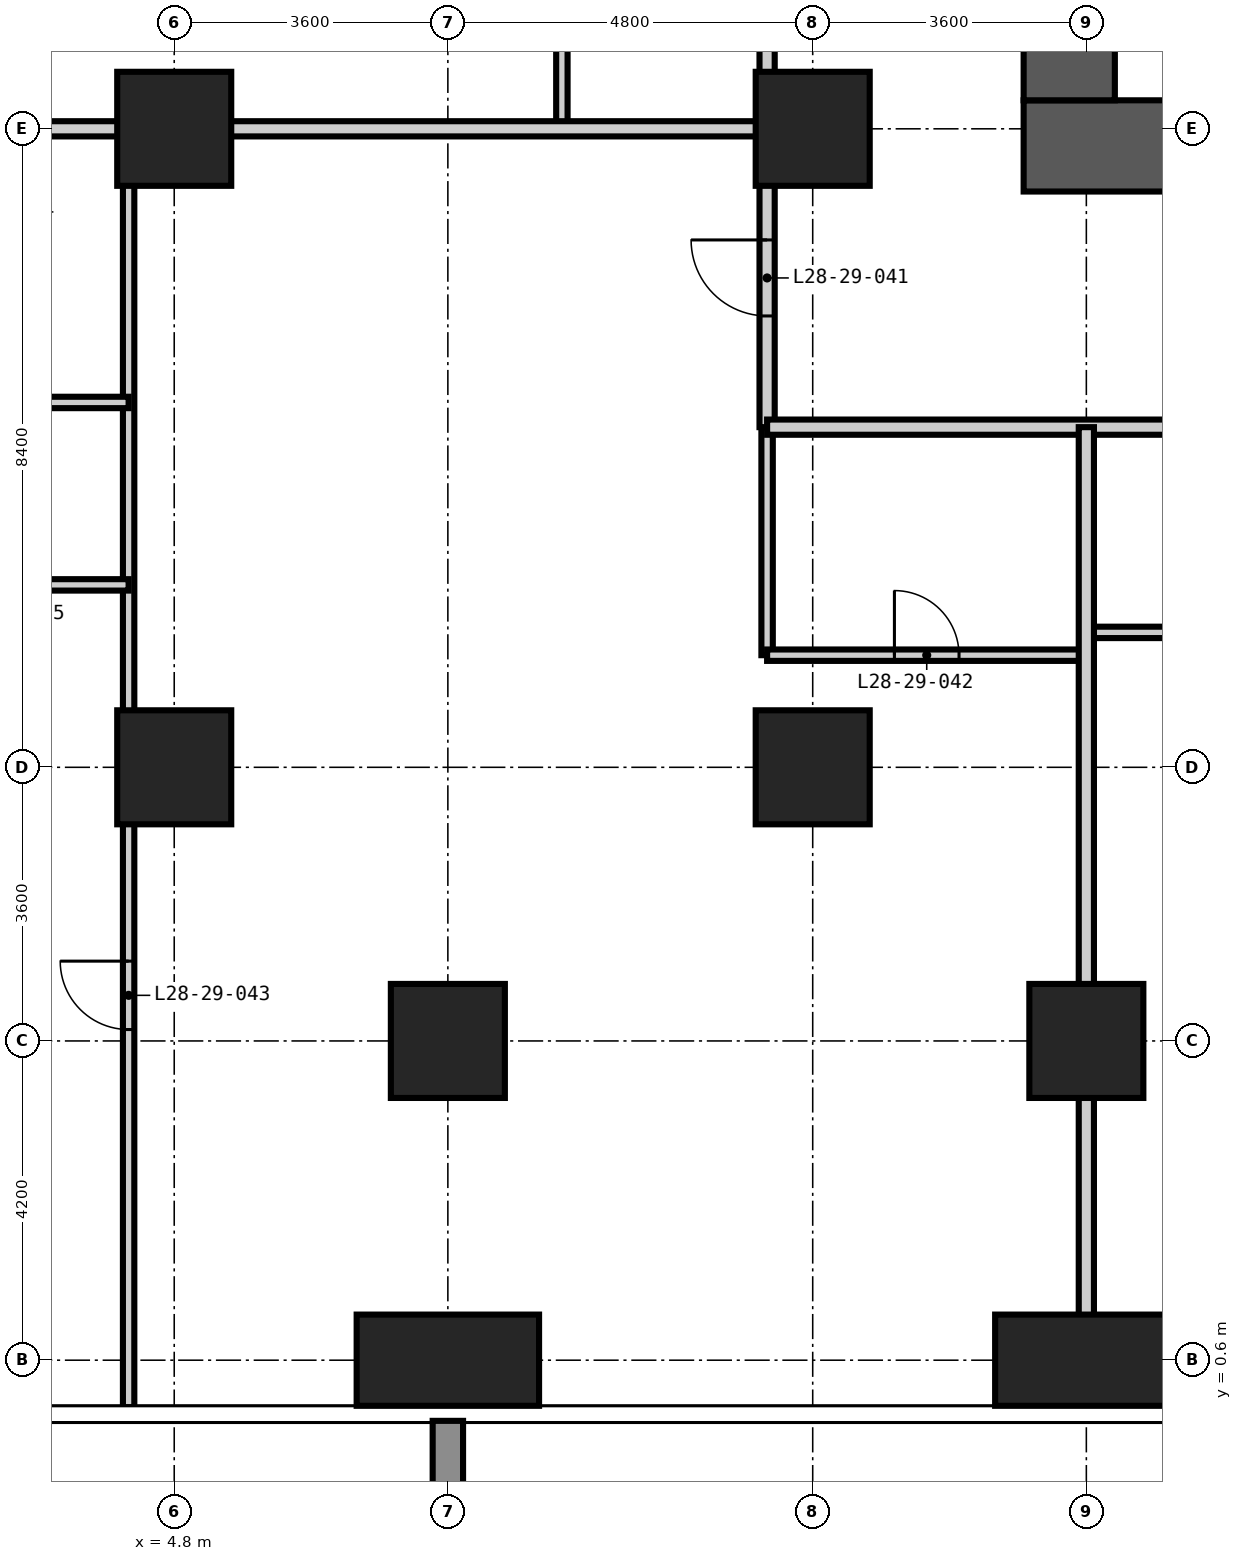
"""IFC4 building model, lengths in metres.
Left out: names, types, materials, properties, quantities, classifications, styles, units other than length and angle.
Written with IfcOpenShell. Run it as: python <this file> out.ifc"""

import sys

from ifc_helpers import new_model, si_unit, direction, frame, frame_2d, origin, origin_2d, place, context, subcontext, project, spatial, rectangle, extrude, element, fill, save


model = new_model("IFC4")
c1 = context("Model", 3, precision=1e-05, world=origin(), true_north=direction((0.0, 1.0)))
c2 = subcontext(c1, "Body", "Model", "MODEL_VIEW")
j1 = project(units=[si_unit("LENGTHUNIT", "METRE"), si_unit("PLANEANGLEUNIT", "RADIAN")], contexts=[c1])
p1 = place(None, origin())
s1 = spatial("IfcSite", under=j1, at=p1, CompositionType="ELEMENT")
p2 = place(p1, origin())
s2 = spatial("IfcBuilding", under=s1, at=p2, CompositionType="ELEMENT")
p3 = place(p2, frame((0.0, 0.0, 111.6)))
s3 = spatial("IfcBuildingStorey", under=s2, at=p3, CompositionType="ELEMENT", Elevation=111.6)
for number, where, z_axis, x_axis in (
    (1, (4.8, 8.4, -0.35), (0.0, 0.0, 1.0), (1.0, 0.0, 0.0)),
    (2, (4.8, 16.8, -0.35), (0.0, 0.0, 1.0), (1.0, 0.0, 0.0)),
):
    element("IfcColumn", number, at=place(p3, frame(where, z_axis=z_axis, x_axis=x_axis)), inside=s3, PredefinedType="COLUMN", context=c2, shape_type="SweptSolid", body=[
        extrude(rectangle(XDim=1.5, YDim=1.5, at=origin_2d()), origin(), (0.0, 0.0, 1.0), 3.6),
    ])
p4 = place(p3, frame((8.4, 0.6, -0.35), z_axis=(0.0, 0.0, 1.0), x_axis=(1.0, 0.0, 0.0)))
e3 = element("IfcColumn", 3, at=p4, inside=s3, PredefinedType="COLUMN", context=c2, shape_type="SweptSolid", body=[
    extrude(rectangle(XDim=2.4, YDim=1.2, at=origin_2d()), origin(), (0.0, 0.0, 1.0), 3.6),
])
for number, where, z_axis, x_axis in (
    (4, (8.4, 4.8, -0.35), (0.0, 0.0, 1.0), (1.0, 0.0, 0.0)),
    (5, (13.2, 8.4, -0.35), (0.0, 0.0, 1.0), (1.0, 0.0, 0.0)),
    (6, (13.2, 16.8, -0.35), (0.0, 0.0, 1.0), (1.0, 0.0, 0.0)),
):
    element("IfcColumn", number, at=place(p3, frame(where, z_axis=z_axis, x_axis=x_axis)), inside=s3, PredefinedType="COLUMN", context=c2, shape_type="SweptSolid", body=[
        extrude(rectangle(XDim=1.5, YDim=1.5, at=origin_2d()), origin(), (0.0, 0.0, 1.0), 3.6),
    ])
p5 = place(p3, frame((16.8, 0.6, -0.35), z_axis=(0.0, 0.0, 1.0), x_axis=(1.0, 0.0, 0.0)))
e7 = element("IfcColumn", 7, at=p5, inside=s3, PredefinedType="COLUMN", context=c2, shape_type="SweptSolid", body=[
    extrude(rectangle(XDim=2.4, YDim=1.2, at=origin_2d()), origin(), (0.0, 0.0, 1.0), 3.6),
])
p6 = place(p3, frame((16.8, 4.8, -0.35), z_axis=(0.0, 0.0, 1.0), x_axis=(1.0, 0.0, 0.0)))
e8 = element("IfcColumn", 8, at=p6, inside=s3, PredefinedType="COLUMN", context=c2, shape_type="SweptSolid", body=[
    extrude(rectangle(XDim=1.5, YDim=1.5, at=origin_2d()), origin(), (0.0, 0.0, 1.0), 3.6),
])
p7 = place(p3, frame((15.975, 16.575, -0.35), z_axis=(0.0, 0.0, 1.0), x_axis=(1.0, 0.0, 0.0)))
e9 = element("IfcWall", 9, at=p7, inside=s3, PredefinedType="SHEAR", context=c2, shape_type="SweptSolid", body=[
    extrude(rectangle(XDim=26.85, YDim=1.2, at=frame_2d((13.425, 0.0))), origin(), (0.0, 0.0, 1.0), 3.6),
])
p8 = place(p7, frame((12.925, 0.0, 0.35)))
e10 = element("IfcOpeningElement", 10, at=p8, cuts=e9, PredefinedType="OPENING", context=c2, shape_type="SweptSolid", body=[
    extrude(rectangle(XDim=1.0, YDim=2.1, at=frame_2d((0.5, 1.05))), frame((0.0, 0.61, 0.0), z_axis=(0.0, -1.0, 0.0), x_axis=(1.0, 0.0, 0.0)), (0.0, 0.0, 1.0), 1.22),
])
p9 = place(p7, frame((19.225, 0.0, 0.35)))
e11 = element("IfcOpeningElement", 11, at=p9, cuts=e9, PredefinedType="OPENING", context=c2, shape_type="SweptSolid", body=[
    extrude(rectangle(XDim=1.0, YDim=2.1, at=frame_2d((0.5, 1.05))), frame((0.0, 0.61, 0.0), z_axis=(0.0, -1.0, 0.0), x_axis=(1.0, 0.0, 0.0)), (0.0, 0.0, 1.0), 1.22),
])
p10 = place(p3, frame((16.575, 41.625, -0.35), z_axis=(0.0, 0.0, 1.0), x_axis=(0.0, -1.0, 0.0)))
e12 = element("IfcWall", 12, at=p10, inside=s3, PredefinedType="SHEAR", context=c2, shape_type="SweptSolid", body=[
    extrude(rectangle(XDim=24.45, YDim=1.2, at=frame_2d((12.225, 0.0))), origin(), (0.0, 0.0, 1.0), 3.6),
])
p11 = place(p10, frame((11.325, 0.0, 0.35)))
e13 = element("IfcOpeningElement", 13, at=p11, cuts=e12, PredefinedType="OPENING", context=c2, shape_type="SweptSolid", body=[
    extrude(rectangle(XDim=1.8, YDim=2.2, at=frame_2d((0.9, 1.1))), frame((0.0, 0.61, 0.0), z_axis=(0.0, -1.0, 0.0), x_axis=(1.0, 0.0, 0.0)), (0.0, 0.0, 1.0), 1.22),
])
p12 = place(p10, frame((20.125, 0.0, 0.35)))
e14 = element("IfcOpeningElement", 14, at=p12, cuts=e12, PredefinedType="OPENING", context=c2, shape_type="SweptSolid", body=[
    extrude(rectangle(XDim=1.0, YDim=2.1, at=frame_2d((0.5, 1.05))), frame((0.0, 0.61, 0.0), z_axis=(0.0, -1.0, 0.0), x_axis=(1.0, 0.0, 0.0)), (0.0, 0.0, 1.0), 1.22),
])
p13 = place(p10, frame((5.425, 0.0, 0.35)))
e15 = element("IfcOpeningElement", 15, at=p13, cuts=e12, PredefinedType="OPENING", context=c2, shape_type="SweptSolid", body=[
    extrude(rectangle(XDim=1.0, YDim=2.1, at=frame_2d((0.5, 1.05))), frame((0.0, 0.61, 0.0), z_axis=(0.0, -1.0, 0.0), x_axis=(1.0, 0.0, 0.0)), (0.0, 0.0, 1.0), 1.22),
])
p14 = place(p3, frame((9.9, 16.8, 0.0), z_axis=(0.0, 0.0, 1.0), x_axis=(0.0, 1.0, 0.0)))
e16 = element("IfcWall", 16, at=p14, inside=s3, PredefinedType="PARTITIONING", context=c2, shape_type="SweptSolid", body=[
    extrude(rectangle(XDim=2.4, YDim=0.15, at=frame_2d((1.2, 0.0))), origin(), (0.0, 0.0, 1.0), 3.25),
])
p15 = place(p3, frame((12.6, 9.875, 0.0), z_axis=(0.0, 0.0, 1.0), x_axis=(0.0, 1.0, 0.0)))
e17 = element("IfcWall", 17, at=p15, inside=s3, PredefinedType="PARTITIONING", context=c2, shape_type="SweptSolid", body=[
    extrude(rectangle(XDim=3.0, YDim=0.15, at=frame_2d((1.5, 0.0))), origin(), (0.0, 0.0, 1.0), 3.25),
])
p16 = place(p3, frame((12.6, 9.875, 0.0), z_axis=(0.0, 0.0, 1.0), x_axis=(1.0, 0.0, 0.0)))
e18 = element("IfcWall", 18, at=p16, inside=s3, PredefinedType="PARTITIONING", context=c2, shape_type="SweptSolid", body=[
    extrude(rectangle(XDim=4.2, YDim=0.15, at=frame_2d((2.1, 0.0))), origin(), (0.0, 0.0, 1.0), 3.25),
])
p17 = place(p16, frame((1.675, 0.0, 0.0)))
e19 = element("IfcOpeningElement", 19, at=p17, cuts=e18, PredefinedType="OPENING", context=c2, shape_type="SweptSolid", body=[
    extrude(rectangle(XDim=0.85, YDim=2.1, at=frame_2d((0.425, 1.05))), frame((0.0, 0.085, 0.0), z_axis=(0.0, -1.0, 0.0), x_axis=(1.0, 0.0, 0.0)), (0.0, 0.0, 1.0), 0.17),
])
p18 = place(p3, frame((16.8, 10.175, 0.0), z_axis=(0.0, 0.0, 1.0), x_axis=(1.0, 0.0, 0.0)))
e20 = element("IfcWall", 20, at=p18, inside=s3, PredefinedType="PARTITIONING", context=c2, shape_type="SweptSolid", body=[
    extrude(rectangle(XDim=2.4, YDim=0.15, at=frame_2d((1.2, 0.0))), origin(), (0.0, 0.0, 1.0), 3.25),
])
p19 = place(p3, frame((12.6, 12.875, 0.0), z_axis=(0.0, 0.0, 1.0), x_axis=(0.0, 1.0, 0.0)))
e21 = element("IfcWall", 21, at=p19, inside=s3, PredefinedType="PARTITIONING", context=c2, shape_type="SweptSolid", body=[
    extrude(rectangle(XDim=31.85, YDim=0.2, at=frame_2d((15.925, 0.0))), origin(), (0.0, 0.0, 1.0), 3.25),
])
p20 = place(p19, frame((8.825, 0.0, 0.0)))
e22 = element("IfcOpeningElement", 22, at=p20, cuts=e21, PredefinedType="OPENING", context=c2, shape_type="SweptSolid", body=[
    extrude(rectangle(XDim=1.0, YDim=2.2, at=frame_2d((0.5, 1.1))), frame((0.0, 0.11, 0.0), z_axis=(0.0, -1.0, 0.0), x_axis=(1.0, 0.0, 0.0)), (0.0, 0.0, 1.0), 0.22),
])
p21 = place(p19, frame((17.225, 0.0, 0.0)))
e23 = element("IfcOpeningElement", 23, at=p21, cuts=e21, PredefinedType="OPENING", context=c2, shape_type="SweptSolid", body=[
    extrude(rectangle(XDim=1.0, YDim=2.2, at=frame_2d((0.5, 1.1))), frame((0.0, 0.11, 0.0), z_axis=(0.0, -1.0, 0.0), x_axis=(1.0, 0.0, 0.0)), (0.0, 0.0, 1.0), 0.22),
])
p22 = place(p19, frame((25.625, 0.0, 0.0)))
e24 = element("IfcOpeningElement", 24, at=p22, cuts=e21, PredefinedType="OPENING", context=c2, shape_type="SweptSolid", body=[
    extrude(rectangle(XDim=1.0, YDim=2.2, at=frame_2d((0.5, 1.1))), frame((0.0, 0.11, 0.0), z_axis=(0.0, -1.0, 0.0), x_axis=(1.0, 0.0, 0.0)), (0.0, 0.0, 1.0), 0.22),
])
p23 = place(p19, frame((1.463, 0.0, 0.0)))
e25 = element("IfcOpeningElement", 25, at=p23, cuts=e21, PredefinedType="OPENING", context=c2, shape_type="SweptSolid", body=[
    extrude(rectangle(XDim=1.0, YDim=2.2, at=frame_2d((0.5, 1.1))), frame((0.0, 0.11, 0.0), z_axis=(0.0, -1.0, 0.0), x_axis=(1.0, 0.0, 0.0)), (0.0, 0.0, 1.0), 0.22),
])
p24 = place(p19, frame((29.987, 0.0, 0.0)))
e26 = element("IfcOpeningElement", 26, at=p24, cuts=e21, PredefinedType="OPENING", context=c2, shape_type="SweptSolid", body=[
    extrude(rectangle(XDim=1.0, YDim=2.2, at=frame_2d((0.5, 1.1))), frame((0.0, 0.11, 0.0), z_axis=(0.0, -1.0, 0.0), x_axis=(1.0, 0.0, 0.0)), (0.0, 0.0, 1.0), 0.22),
])
p25 = place(p3, frame((45.325, 12.875, 0.0), z_axis=(0.0, 0.0, 1.0), x_axis=(-1.0, 0.0, 0.0)))
e27 = element("IfcWall", 27, at=p25, inside=s3, PredefinedType="PARTITIONING", context=c2, shape_type="SweptSolid", body=[
    extrude(rectangle(XDim=32.725, YDim=0.2, at=frame_2d((16.362, 0.0))), origin(), (0.0, 0.0, 1.0), 3.25),
])
p26 = place(p25, frame((22.625, 0.0, 0.0)))
e28 = element("IfcOpeningElement", 28, at=p26, cuts=e27, PredefinedType="OPENING", context=c2, shape_type="SweptSolid", body=[
    extrude(rectangle(XDim=1.0, YDim=2.2, at=frame_2d((0.5, 1.1))), frame((0.0, 0.11, 0.0), z_axis=(0.0, -1.0, 0.0), x_axis=(1.0, 0.0, 0.0)), (0.0, 0.0, 1.0), 0.22),
])
p27 = place(p25, frame((14.225, 0.0, 0.0)))
e29 = element("IfcOpeningElement", 29, at=p27, cuts=e27, PredefinedType="OPENING", context=c2, shape_type="SweptSolid", body=[
    extrude(rectangle(XDim=1.0, YDim=2.2, at=frame_2d((0.5, 1.1))), frame((0.0, 0.11, 0.0), z_axis=(0.0, -1.0, 0.0), x_axis=(1.0, 0.0, 0.0)), (0.0, 0.0, 1.0), 0.22),
])
p28 = place(p25, frame((5.825, 0.0, 0.0)))
e30 = element("IfcOpeningElement", 30, at=p28, cuts=e27, PredefinedType="OPENING", context=c2, shape_type="SweptSolid", body=[
    extrude(rectangle(XDim=1.0, YDim=2.2, at=frame_2d((0.5, 1.1))), frame((0.0, 0.11, 0.0), z_axis=(0.0, -1.0, 0.0), x_axis=(1.0, 0.0, 0.0)), (0.0, 0.0, 1.0), 0.22),
])
p29 = place(p3, frame((16.8, -0.018, 0.0), z_axis=(0.0, 0.0, 1.0), x_axis=(0.0, 1.0, 0.0)))
e31 = element("IfcWall", 31, at=p29, inside=s3, PredefinedType="PARTITIONING", context=c2, shape_type="SweptSolid", body=[
    extrude(rectangle(XDim=12.893, YDim=0.2, at=frame_2d((6.447, 0.0))), origin(), (0.0, 0.0, 1.0), 3.25),
])
p30 = place(p3, frame((-0.018, 16.8, 0.0), z_axis=(0.0, 0.0, 1.0), x_axis=(1.0, 0.0, 0.0)))
e32 = element("IfcWall", 32, at=p30, inside=s3, PredefinedType="PARTITIONING", context=c2, shape_type="SweptSolid", body=[
    extrude(rectangle(XDim=12.618, YDim=0.2, at=frame_2d((6.309, 0.0))), origin(), (0.0, 0.0, 1.0), 3.25),
])
p31 = place(p3, frame((4.2, -0.018, 0.0), z_axis=(0.0, 0.0, 1.0), x_axis=(0.0, 1.0, 0.0)))
e33 = element("IfcWall", 33, at=p31, inside=s3, PredefinedType="PARTITIONING", context=c2, shape_type="SweptSolid", body=[
    extrude(rectangle(XDim=16.818, YDim=0.15, at=frame_2d((8.409, 0.0))), origin(), (0.0, 0.0, 1.0), 3.25),
])
p32 = place(p31, frame((4.968, 0.0, 0.0)))
e34 = element("IfcOpeningElement", 34, at=p32, cuts=e33, PredefinedType="OPENING", context=c2, shape_type="SweptSolid", body=[
    extrude(rectangle(XDim=0.9, YDim=2.1, at=frame_2d((0.45, 1.05))), frame((0.0, 0.085, 0.0), z_axis=(0.0, -1.0, 0.0), x_axis=(1.0, 0.0, 0.0)), (0.0, 0.0, 1.0), 0.17),
])
p33 = place(p3, frame((1.2, 10.8, 0.0), z_axis=(0.0, 0.0, 1.0), x_axis=(1.0, 0.0, 0.0)))
e35 = element("IfcWall", 35, at=p33, inside=s3, PredefinedType="PARTITIONING", context=c2, shape_type="SweptSolid", body=[
    extrude(rectangle(XDim=3.0, YDim=0.15, at=frame_2d((1.5, 0.0))), origin(), (0.0, 0.0, 1.0), 3.25),
])
p34 = place(p33, frame((1.05, 0.0, 0.0)))
e36 = element("IfcOpeningElement", 36, at=p34, cuts=e35, PredefinedType="OPENING", context=c2, shape_type="SweptSolid", body=[
    extrude(rectangle(XDim=0.9, YDim=2.1, at=frame_2d((0.45, 1.05))), frame((0.0, 0.085, 0.0), z_axis=(0.0, -1.0, 0.0), x_axis=(1.0, 0.0, 0.0)), (0.0, 0.0, 1.0), 0.17),
])
p35 = place(p3, frame((1.2, 13.2, 0.0), z_axis=(0.0, 0.0, 1.0), x_axis=(1.0, 0.0, 0.0)))
e37 = element("IfcWall", 37, at=p35, inside=s3, PredefinedType="PARTITIONING", context=c2, shape_type="SweptSolid", body=[
    extrude(rectangle(XDim=3.0, YDim=0.15, at=frame_2d((1.5, 0.0))), origin(), (0.0, 0.0, 1.0), 3.25),
])
p36 = place(p23, origin())
e38 = element("IfcDoor", 38, at=p36, inside=s3, OperationType="SINGLE_SWING_RIGHT", PredefinedType="DOOR", context=c2, shape_type="SweptSolid", body=[
    extrude(rectangle(XDim=1.0, YDim=2.2, at=frame_2d((0.5, 1.1))), frame((0.0, 0.025, 0.0), z_axis=(0.0, -1.0, 0.0), x_axis=(1.0, 0.0, 0.0)), (0.0, 0.0, 1.0), 0.05),
])
fill(e25, e38)
p37 = place(p17, origin())
e39 = element("IfcDoor", 39, at=p37, inside=s3, OperationType="SINGLE_SWING_LEFT", PredefinedType="DOOR", context=c2, shape_type="SweptSolid", body=[
    extrude(rectangle(XDim=0.85, YDim=2.1, at=frame_2d((0.425, 1.05))), frame((0.0, 0.025, 0.0), z_axis=(0.0, -1.0, 0.0), x_axis=(1.0, 0.0, 0.0)), (0.0, 0.0, 1.0), 0.05),
])
fill(e19, e39)
p38 = place(p32, origin())
e40 = element("IfcDoor", 40, at=p38, inside=s3, OperationType="SINGLE_SWING_RIGHT", PredefinedType="DOOR", context=c2, shape_type="SweptSolid", body=[
    extrude(rectangle(XDim=0.9, YDim=2.1, at=frame_2d((0.45, 1.05))), frame((0.0, 0.025, 0.0), z_axis=(0.0, -1.0, 0.0), x_axis=(1.0, 0.0, 0.0)), (0.0, 0.0, 1.0), 0.05),
])
fill(e34, e40)
save(model, sys.argv[1])
